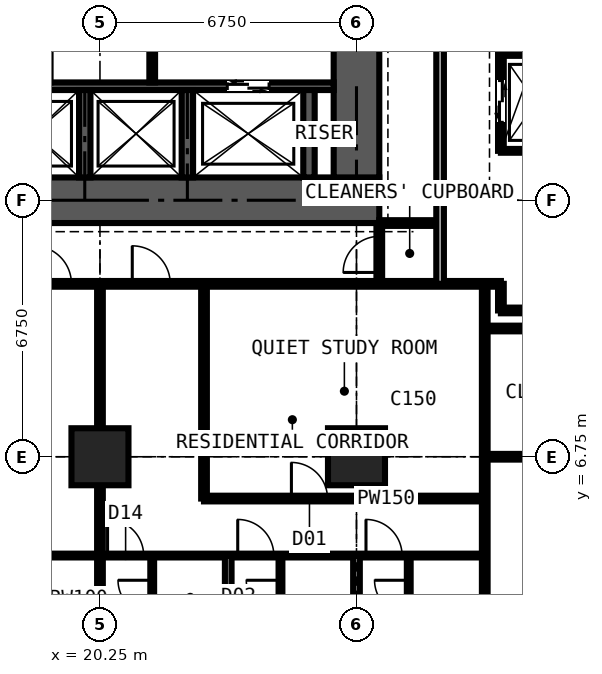
"""IFC4 building model, lengths in metres.
Left out: names, types, materials, properties, quantities, classifications, styles, units other than length and angle.
Written with IfcOpenShell. Run it as: python <this file> out.ifc"""

import sys

from ifc_helpers import new_model, si_unit, direction, frame, frame_2d, origin, origin_2d, place, context, subcontext, project, spatial, rectangle, extrude, element, fill, save


model = new_model("IFC4")
c1 = context("Model", 3, precision=1e-05, world=origin(), true_north=direction((0.0, 1.0)))
c2 = subcontext(c1, "Body", "Model", "MODEL_VIEW")
j1 = project(units=[si_unit("LENGTHUNIT", "METRE"), si_unit("PLANEANGLEUNIT", "RADIAN")], contexts=[c1])
p1 = place(None, origin())
s1 = spatial("IfcSite", under=j1, at=p1, CompositionType="ELEMENT")
p2 = place(p1, origin())
s2 = spatial("IfcBuilding", under=s1, at=p2, CompositionType="ELEMENT")
p3 = place(p2, frame((0.0, 0.0, 123.3)))
s3 = spatial("IfcBuildingStorey", under=s2, at=p3, CompositionType="ELEMENT", Elevation=123.3)
for number, where, z_axis, x_axis in (
    (1, (20.25, 6.75, 0.0), (0.0, 0.0, 1.0), (1.0, 0.0, 0.0)),
    (2, (27.0, 6.75, 0.0), (0.0, 0.0, 1.0), (1.0, 0.0, 0.0)),
):
    element("IfcColumn", number, at=place(p3, frame(where, z_axis=z_axis, x_axis=x_axis)), inside=s3, PredefinedType="COLUMN", context=c2, shape_type="SweptSolid", body=[
        extrude(rectangle(XDim=1.5, YDim=1.5, at=origin_2d()), origin(), (0.0, 0.0, 1.0), 3.6),
    ])
p4 = place(p3, frame((12.9, 13.5, 0.0), z_axis=(0.0, 0.0, 1.0), x_axis=(1.0, 0.0, 0.0)))
e3 = element("IfcWall", 3, at=p4, inside=s3, PredefinedType="SHEAR", context=c2, shape_type="SweptSolid", body=[
    extrude(rectangle(XDim=14.7, YDim=1.2, at=frame_2d((7.35, 0.0))), origin(), (0.0, 0.0, 1.0), 3.6),
])
p5 = place(p3, frame((27.0, 14.1, 0.0), z_axis=(0.0, 0.0, 1.0), x_axis=(0.0, 1.0, 0.0)))
e4 = element("IfcWall", 4, at=p5, inside=s3, PredefinedType="SHEAR", context=c2, shape_type="SweptSolid", body=[
    extrude(rectangle(XDim=12.3, YDim=1.2, at=frame_2d((6.15, 0.0))), origin(), (0.0, 0.0, 1.0), 3.6),
])
p6 = place(p5, frame((3.65, 0.0, 0.0)))
e5 = element("IfcOpeningElement", 5, at=p6, cuts=e4, PredefinedType="OPENING", context=c2, shape_type="SweptSolid", body=[
    extrude(rectangle(XDim=1.2, YDim=2.2, at=frame_2d((0.6, 1.1))), frame((0.0, 0.61, 0.0), z_axis=(0.0, -1.0, 0.0), x_axis=(1.0, 0.0, 0.0)), (0.0, 0.0, 1.0), 1.22),
])
p7 = place(p3, frame((14.1, 16.5, 0.0), z_axis=(0.0, 0.0, 1.0), x_axis=(1.0, 0.0, 0.0)))
e6 = element("IfcWall", 6, at=p7, inside=s3, PredefinedType="SHEAR", context=c2, shape_type="SweptSolid", body=[
    extrude(rectangle(XDim=12.3, YDim=0.2, at=frame_2d((6.15, 0.0))), origin(), (0.0, 0.0, 1.0), 3.6),
])
p8 = place(p7, frame((0.9, 0.0, 0.0)))
e7 = element("IfcOpeningElement", 7, at=p8, cuts=e6, PredefinedType="OPENING", context=c2, shape_type="SweptSolid", body=[
    extrude(rectangle(XDim=1.1, YDim=2.2, at=frame_2d((0.55, 1.1))), frame((0.0, 0.11, 0.0), z_axis=(0.0, -1.0, 0.0), x_axis=(1.0, 0.0, 0.0)), (0.0, 0.0, 1.0), 0.22),
])
p9 = place(p7, frame((9.5, 0.0, 0.0)))
e8 = element("IfcOpeningElement", 8, at=p9, cuts=e6, PredefinedType="OPENING", context=c2, shape_type="SweptSolid", body=[
    extrude(rectangle(XDim=1.1, YDim=2.2, at=frame_2d((0.55, 1.1))), frame((0.0, 0.11, 0.0), z_axis=(0.0, -1.0, 0.0), x_axis=(1.0, 0.0, 0.0)), (0.0, 0.0, 1.0), 0.22),
])
for number, where, z_axis, x_axis in (
    (9, (19.85, 14.1, 0.0), (0.0, 0.0, 1.0), (0.0, 1.0, 0.0)),
    (10, (22.55, 14.1, 0.0), (0.0, 0.0, 1.0), (0.0, 1.0, 0.0)),
    (11, (25.75, 14.1, 0.0), (0.0, 0.0, 1.0), (0.0, 1.0, 0.0)),
):
    element("IfcWall", number, at=place(p3, frame(where, z_axis=z_axis, x_axis=x_axis)), inside=s3, PredefinedType="SHEAR", context=c2, shape_type="SweptSolid", body=[
        extrude(rectangle(XDim=2.3, YDim=0.3, at=frame_2d((1.15, 0.0))), origin(), (0.0, 0.0, 1.0), 3.6),
    ])
p10 = place(p3, frame((21.625, 16.6, 0.0), z_axis=(0.0, 0.0, 1.0), x_axis=(0.0, 1.0, 0.0)))
e12 = element("IfcWall", 12, at=p10, inside=s3, PredefinedType="PARTITIONING", context=c2, shape_type="SweptSolid", body=[
    extrude(rectangle(XDim=3.5, YDim=0.15, at=frame_2d((1.75, 0.0))), origin(), (0.0, 0.0, 1.0), 3.375),
])
p11 = place(p10, frame((1.15, 0.0, 0.0)))
e13 = element("IfcOpeningElement", 13, at=p11, cuts=e12, PredefinedType="OPENING", context=c2, shape_type="SweptSolid", body=[
    extrude(rectangle(XDim=1.2, YDim=2.2, at=frame_2d((0.6, 1.1))), frame((0.0, 0.085, 0.0), z_axis=(0.0, -1.0, 0.0), x_axis=(1.0, 0.0, 0.0)), (0.0, 0.0, 1.0), 0.17),
])
p12 = place(p3, frame((6.75, 4.15, 0.0), z_axis=(0.0, 0.0, 1.0), x_axis=(1.0, 0.0, 0.0)))
e14 = element("IfcWall", 14, at=p12, inside=s3, PredefinedType="PARTITIONING", context=c2, shape_type="SweptSolid", body=[
    extrude(rectangle(XDim=23.625, YDim=0.1, at=frame_2d((11.812, 0.0))), origin(), (0.0, 0.0, 1.0), 3.375),
])
p13 = place(p12, frame((2.85, 0.0, 0.0)))
e15 = element("IfcOpeningElement", 15, at=p13, cuts=e14, PredefinedType="OPENING", context=c2, shape_type="SweptSolid", body=[
    extrude(rectangle(XDim=1.0, YDim=2.2, at=frame_2d((0.5, 1.1))), frame((0.0, 0.06, 0.0), z_axis=(0.0, -1.0, 0.0), x_axis=(1.0, 0.0, 0.0)), (0.0, 0.0, 1.0), 0.12),
])
p14 = place(p12, frame((6.95, 0.0, 0.0)))
e16 = element("IfcOpeningElement", 16, at=p14, cuts=e14, PredefinedType="OPENING", context=c2, shape_type="SweptSolid", body=[
    extrude(rectangle(XDim=0.95, YDim=2.2, at=frame_2d((0.475, 1.1))), frame((0.0, 0.06, 0.0), z_axis=(0.0, -1.0, 0.0), x_axis=(1.0, 0.0, 0.0)), (0.0, 0.0, 1.0), 0.12),
])
p15 = place(p12, frame((10.375, 0.0, 0.0)))
e17 = element("IfcOpeningElement", 17, at=p15, cuts=e14, PredefinedType="OPENING", context=c2, shape_type="SweptSolid", body=[
    extrude(rectangle(XDim=0.95, YDim=2.2, at=frame_2d((0.475, 1.1))), frame((0.0, 0.06, 0.0), z_axis=(0.0, -1.0, 0.0), x_axis=(1.0, 0.0, 0.0)), (0.0, 0.0, 1.0), 0.12),
])
p16 = place(p12, frame((13.7, 0.0, 0.0)))
e18 = element("IfcOpeningElement", 18, at=p16, cuts=e14, PredefinedType="OPENING", context=c2, shape_type="SweptSolid", body=[
    extrude(rectangle(XDim=0.95, YDim=2.2, at=frame_2d((0.475, 1.1))), frame((0.0, 0.06, 0.0), z_axis=(0.0, -1.0, 0.0), x_axis=(1.0, 0.0, 0.0)), (0.0, 0.0, 1.0), 0.12),
])
p17 = place(p12, frame((17.125, 0.0, 0.0)))
e19 = element("IfcOpeningElement", 19, at=p17, cuts=e14, PredefinedType="OPENING", context=c2, shape_type="SweptSolid", body=[
    extrude(rectangle(XDim=0.95, YDim=2.2, at=frame_2d((0.475, 1.1))), frame((0.0, 0.06, 0.0), z_axis=(0.0, -1.0, 0.0), x_axis=(1.0, 0.0, 0.0)), (0.0, 0.0, 1.0), 0.12),
])
p18 = place(p12, frame((20.5, 0.0, 0.0)))
e20 = element("IfcOpeningElement", 20, at=p18, cuts=e14, PredefinedType="OPENING", context=c2, shape_type="SweptSolid", body=[
    extrude(rectangle(XDim=0.95, YDim=2.2, at=frame_2d((0.475, 1.1))), frame((0.0, 0.06, 0.0), z_axis=(0.0, -1.0, 0.0), x_axis=(1.0, 0.0, 0.0)), (0.0, 0.0, 1.0), 0.12),
])
p19 = place(p3, frame((10.125, 11.3, 0.0), z_axis=(0.0, 0.0, 1.0), x_axis=(1.0, 0.0, 0.0)))
e21 = element("IfcWall", 21, at=p19, inside=s3, PredefinedType="PARTITIONING", context=c2, shape_type="SweptSolid", body=[
    extrude(rectangle(XDim=20.675, YDim=0.15, at=frame_2d((10.337, 0.0))), origin(), (0.0, 0.0, 1.0), 3.375),
])
p20 = place(p19, frame((8.375, 0.0, 0.0)))
e22 = element("IfcOpeningElement", 22, at=p20, cuts=e21, PredefinedType="OPENING", context=c2, shape_type="SweptSolid", body=[
    extrude(rectangle(XDim=1.0, YDim=2.2, at=frame_2d((0.5, 1.1))), frame((0.0, 0.085, 0.0), z_axis=(0.0, -1.0, 0.0), x_axis=(1.0, 0.0, 0.0)), (0.0, 0.0, 1.0), 0.17),
])
p21 = place(p19, frame((10.975, 0.0, 0.0)))
e23 = element("IfcOpeningElement", 23, at=p21, cuts=e21, PredefinedType="OPENING", context=c2, shape_type="SweptSolid", body=[
    extrude(rectangle(XDim=1.0, YDim=2.2, at=frame_2d((0.5, 1.1))), frame((0.0, 0.085, 0.0), z_axis=(0.0, -1.0, 0.0), x_axis=(1.0, 0.0, 0.0)), (0.0, 0.0, 1.0), 0.17),
])
p22 = place(p19, frame((3.925, 0.0, 0.0)))
e24 = element("IfcOpeningElement", 24, at=p22, cuts=e21, PredefinedType="OPENING", context=c2, shape_type="SweptSolid", body=[
    extrude(rectangle(XDim=0.95, YDim=2.2, at=frame_2d((0.475, 1.1))), frame((0.0, 0.085, 0.0), z_axis=(0.0, -1.0, 0.0), x_axis=(1.0, 0.0, 0.0)), (0.0, 0.0, 1.0), 0.17),
])
p23 = place(p3, frame((20.25, -0.734, 0.0), z_axis=(0.0, 0.0, 1.0), x_axis=(0.0, 1.0, 0.0)))
e25 = element("IfcWall", 25, at=p23, inside=s3, PredefinedType="PARTITIONING", context=c2, shape_type="SweptSolid", body=[
    extrude(rectangle(XDim=12.034, YDim=0.15, at=frame_2d((6.017, 0.0))), origin(), (0.0, 0.0, 1.0), 2.61),
])
p24 = place(p3, frame((21.625, 1.95, 0.0), z_axis=(0.0, 0.0, 1.0), x_axis=(0.0, 1.0, 0.0)))
e26 = element("IfcWall", 26, at=p24, inside=s3, PredefinedType="PARTITIONING", context=c2, shape_type="SweptSolid", body=[
    extrude(rectangle(XDim=2.2, YDim=0.1, at=frame_2d((1.1, 0.0))), origin(), (0.0, 0.0, 1.0), 3.375),
])
p25 = place(p24, frame((0.65, 0.0, 0.0)))
e27 = element("IfcOpeningElement", 27, at=p25, cuts=e26, PredefinedType="OPENING", context=c2, shape_type="SweptSolid", body=[
    extrude(rectangle(XDim=0.9, YDim=2.2, at=frame_2d((0.45, 1.1))), frame((0.0, 0.06, 0.0), z_axis=(0.0, -1.0, 0.0), x_axis=(1.0, 0.0, 0.0)), (0.0, 0.0, 1.0), 0.12),
])
p26 = place(p3, frame((22.988, 5.65, 0.0), z_axis=(0.0, 0.0, 1.0), x_axis=(1.0, 0.0, 0.0)))
e28 = element("IfcWall", 28, at=p26, inside=s3, PredefinedType="PARTITIONING", context=c2, shape_type="SweptSolid", body=[
    extrude(rectangle(XDim=7.387, YDim=0.15, at=frame_2d((3.694, 0.0))), origin(), (0.0, 0.0, 1.0), 3.375),
])
p27 = place(p26, frame((2.3, 0.0, 0.0)))
e29 = element("IfcOpeningElement", 29, at=p27, cuts=e28, PredefinedType="OPENING", context=c2, shape_type="SweptSolid", body=[
    extrude(rectangle(XDim=0.95, YDim=2.2, at=frame_2d((0.475, 1.1))), frame((0.0, 0.085, 0.0), z_axis=(0.0, -1.0, 0.0), x_axis=(1.0, 0.0, 0.0)), (0.0, 0.0, 1.0), 0.17),
])
p28 = place(p3, frame((22.988, 5.65, 0.0), z_axis=(0.0, 0.0, 1.0), x_axis=(0.0, 1.0, 0.0)))
e30 = element("IfcWall", 30, at=p28, inside=s3, PredefinedType="PARTITIONING", context=c2, shape_type="SweptSolid", body=[
    extrude(rectangle(XDim=5.65, YDim=0.15, at=frame_2d((2.825, 0.0))), origin(), (0.0, 0.0, 1.0), 3.375),
])
p29 = place(p3, frame((23.625, -0.734, 0.0), z_axis=(0.0, 0.0, 1.0), x_axis=(0.0, 1.0, 0.0)))
e31 = element("IfcWall", 31, at=p29, inside=s3, PredefinedType="PARTITIONING", context=c2, shape_type="SweptSolid", body=[
    extrude(rectangle(XDim=4.884, YDim=0.175, at=frame_2d((2.442, 0.0))), origin(), (0.0, 0.0, 1.0), 3.375),
])
p30 = place(p3, frame((25.0, 1.95, 0.0), z_axis=(0.0, 0.0, 1.0), x_axis=(0.0, 1.0, 0.0)))
e32 = element("IfcWall", 32, at=p30, inside=s3, PredefinedType="PARTITIONING", context=c2, shape_type="SweptSolid", body=[
    extrude(rectangle(XDim=2.2, YDim=0.1, at=frame_2d((1.1, 0.0))), origin(), (0.0, 0.0, 1.0), 3.375),
])
p31 = place(p30, frame((0.65, 0.0, 0.0)))
e33 = element("IfcOpeningElement", 33, at=p31, cuts=e32, PredefinedType="OPENING", context=c2, shape_type="SweptSolid", body=[
    extrude(rectangle(XDim=0.9, YDim=2.2, at=frame_2d((0.45, 1.1))), frame((0.0, 0.06, 0.0), z_axis=(0.0, -1.0, 0.0), x_axis=(1.0, 0.0, 0.0)), (0.0, 0.0, 1.0), 0.12),
])
p32 = place(p3, frame((27.0, -0.734, 0.0), z_axis=(0.0, 0.0, 1.0), x_axis=(0.0, 1.0, 0.0)))
e34 = element("IfcWall", 34, at=p32, inside=s3, PredefinedType="PARTITIONING", context=c2, shape_type="SweptSolid", body=[
    extrude(rectangle(XDim=4.884, YDim=0.175, at=frame_2d((2.442, 0.0))), origin(), (0.0, 0.0, 1.0), 2.61),
])
p33 = place(p3, frame((27.6, 11.3, 0.0), z_axis=(0.0, 0.0, 1.0), x_axis=(0.0, 1.0, 0.0)))
e35 = element("IfcWall", 35, at=p33, inside=s3, PredefinedType="PARTITIONING", context=c2, shape_type="SweptSolid", body=[
    extrude(rectangle(XDim=1.6, YDim=0.15, at=frame_2d((0.8, 0.0))), origin(), (0.0, 0.0, 1.0), 3.375),
])
p34 = place(p33, frame((0.3, 0.0, 0.0)))
e36 = element("IfcOpeningElement", 36, at=p34, cuts=e35, PredefinedType="OPENING", context=c2, shape_type="SweptSolid", body=[
    extrude(rectangle(XDim=0.95, YDim=2.2, at=frame_2d((0.475, 1.1))), frame((0.0, 0.085, 0.0), z_axis=(0.0, -1.0, 0.0), x_axis=(1.0, 0.0, 0.0)), (0.0, 0.0, 1.0), 0.17),
])
p35 = place(p3, frame((27.6, 12.9, 0.0), z_axis=(0.0, 0.0, 1.0), x_axis=(1.0, 0.0, 0.0)))
e37 = element("IfcWall", 37, at=p35, inside=s3, PredefinedType="PARTITIONING", context=c2, shape_type="SweptSolid", body=[
    extrude(rectangle(XDim=1.6, YDim=0.15, at=frame_2d((0.8, 0.0))), origin(), (0.0, 0.0, 1.0), 2.806),
])
p36 = place(p3, frame((28.375, 1.95, 0.0), z_axis=(0.0, 0.0, 1.0), x_axis=(0.0, 1.0, 0.0)))
e38 = element("IfcWall", 38, at=p36, inside=s3, PredefinedType="PARTITIONING", context=c2, shape_type="SweptSolid", body=[
    extrude(rectangle(XDim=2.2, YDim=0.1, at=frame_2d((1.1, 0.0))), origin(), (0.0, 0.0, 1.0), 3.375),
])
p37 = place(p36, frame((0.65, 0.0, 0.0)))
e39 = element("IfcOpeningElement", 39, at=p37, cuts=e38, PredefinedType="OPENING", context=c2, shape_type="SweptSolid", body=[
    extrude(rectangle(XDim=0.9, YDim=2.2, at=frame_2d((0.45, 1.1))), frame((0.0, 0.06, 0.0), z_axis=(0.0, -1.0, 0.0), x_axis=(1.0, 0.0, 0.0)), (0.0, 0.0, 1.0), 0.12),
])
p38 = place(p3, frame((29.2, 11.3, 0.0), z_axis=(0.0, 0.0, 1.0), x_axis=(0.0, 1.0, 0.0)))
e40 = element("IfcWall", 40, at=p38, inside=s3, PredefinedType="PARTITIONING", context=c2, shape_type="SweptSolid", body=[
    extrude(rectangle(XDim=17.9, YDim=0.2, at=frame_2d((8.95, 0.0))), origin(), (0.0, 0.0, 1.0), 3.375),
])
p39 = place(p38, frame((8.35, 0.0, 0.0)))
e41 = element("IfcOpeningElement", 41, at=p39, cuts=e40, PredefinedType="OPENING", context=c2, shape_type="SweptSolid", body=[
    extrude(rectangle(XDim=1.2, YDim=2.2, at=frame_2d((0.6, 1.1))), frame((0.0, 0.11, 0.0), z_axis=(0.0, -1.0, 0.0), x_axis=(1.0, 0.0, 0.0)), (0.0, 0.0, 1.0), 0.22),
])
p40 = place(p3, frame((30.375, -0.734, 0.0), z_axis=(0.0, 0.0, 1.0), x_axis=(0.0, 1.0, 0.0)))
e42 = element("IfcWall", 42, at=p40, inside=s3, PredefinedType="PARTITIONING", context=c2, shape_type="SweptSolid", body=[
    extrude(rectangle(XDim=12.034, YDim=0.15, at=frame_2d((6.017, 0.0))), origin(), (0.0, 0.0, 1.0), 3.375),
])
p41 = place(p3, frame((30.375, 6.75, 0.0), z_axis=(0.0, 0.0, 1.0), x_axis=(1.0, 0.0, 0.0)))
e43 = element("IfcWall", 43, at=p41, inside=s3, PredefinedType="PARTITIONING", context=c2, shape_type="SweptSolid", body=[
    extrude(rectangle(XDim=10.859, YDim=0.15, at=frame_2d((5.429, 0.0))), origin(), (0.0, 0.0, 1.0), 2.877),
])
p42 = place(p41, frame((1.6, 0.0, 0.0)))
e44 = element("IfcOpeningElement", 44, at=p42, cuts=e43, PredefinedType="OPENING", context=c2, shape_type="SweptSolid", body=[
    extrude(rectangle(XDim=1.0, YDim=2.2, at=frame_2d((0.5, 1.1))), frame((0.0, 0.085, 0.0), z_axis=(0.0, -1.0, 0.0), x_axis=(1.0, 0.0, 0.0)), (0.0, 0.0, 1.0), 0.17),
])
p43 = place(p3, frame((30.375, 10.125, 0.0), z_axis=(0.0, 0.0, 1.0), x_axis=(1.0, 0.0, 0.0)))
e45 = element("IfcWall", 45, at=p43, inside=s3, PredefinedType="PARTITIONING", context=c2, shape_type="SweptSolid", body=[
    extrude(rectangle(XDim=10.859, YDim=0.15, at=frame_2d((5.429, 0.0))), origin(), (0.0, 0.0, 1.0), 3.375),
])
p44 = place(p43, frame((2.5, 0.0, 0.0)))
e46 = element("IfcOpeningElement", 46, at=p44, cuts=e45, PredefinedType="OPENING", context=c2, shape_type="SweptSolid", body=[
    extrude(rectangle(XDim=1.0, YDim=2.2, at=frame_2d((0.5, 1.1))), frame((0.0, 0.085, 0.0), z_axis=(0.0, -1.0, 0.0), x_axis=(1.0, 0.0, 0.0)), (0.0, 0.0, 1.0), 0.17),
])
p45 = place(p3, frame((30.8, 10.6, 0.0), z_axis=(0.0, 0.0, 1.0), x_axis=(0.0, 1.0, 0.0)))
e47 = element("IfcWall", 47, at=p45, inside=s3, PredefinedType="PARTITIONING", context=c2, shape_type="SweptSolid", body=[
    extrude(rectangle(XDim=0.7, YDim=0.15, at=frame_2d((0.35, 0.0))), origin(), (0.0, 0.0, 1.0), 3.375),
])
p46 = place(p3, frame((30.8, 10.6, 0.0), z_axis=(0.0, 0.0, 1.0), x_axis=(1.0, 0.0, 0.0)))
e48 = element("IfcWall", 48, at=p46, inside=s3, PredefinedType="PARTITIONING", context=c2, shape_type="SweptSolid", body=[
    extrude(rectangle(XDim=1.85, YDim=0.15, at=frame_2d((0.925, 0.0))), origin(), (0.0, 0.0, 1.0), 3.375),
])
p47 = place(p3, frame((30.8, 14.8, 0.0), z_axis=(0.0, 0.0, 1.0), x_axis=(0.0, 1.0, 0.0)))
e49 = element("IfcWall", 49, at=p47, inside=s3, PredefinedType="PARTITIONING", context=c2, shape_type="SweptSolid", body=[
    extrude(rectangle(XDim=10.9, YDim=0.15, at=frame_2d((5.45, 0.0))), origin(), (0.0, 0.0, 1.0), 3.375),
])
p48 = place(p47, frame((0.75, 0.0, 0.0)))
e50 = element("IfcOpeningElement", 50, at=p48, cuts=e49, PredefinedType="OPENING", context=c2, shape_type="SweptSolid", body=[
    extrude(rectangle(XDim=1.1, YDim=2.2, at=frame_2d((0.55, 1.1))), frame((0.0, 0.085, 0.0), z_axis=(0.0, -1.0, 0.0), x_axis=(1.0, 0.0, 0.0)), (0.0, 0.0, 1.0), 0.17),
])
p49 = place(p47, frame((3.25, 0.0, 0.0)))
e51 = element("IfcOpeningElement", 51, at=p49, cuts=e49, PredefinedType="OPENING", context=c2, shape_type="SweptSolid", body=[
    extrude(rectangle(XDim=1.1, YDim=2.2, at=frame_2d((0.55, 1.1))), frame((0.0, 0.085, 0.0), z_axis=(0.0, -1.0, 0.0), x_axis=(1.0, 0.0, 0.0)), (0.0, 0.0, 1.0), 0.17),
])
p50 = place(p47, frame((6.5, 0.0, 0.0)))
e52 = element("IfcOpeningElement", 52, at=p50, cuts=e49, PredefinedType="OPENING", context=c2, shape_type="SweptSolid", body=[
    extrude(rectangle(XDim=1.1, YDim=2.2, at=frame_2d((0.55, 1.1))), frame((0.0, 0.085, 0.0), z_axis=(0.0, -1.0, 0.0), x_axis=(1.0, 0.0, 0.0)), (0.0, 0.0, 1.0), 0.17),
])
p51 = place(p47, frame((9.05, 0.0, 0.0)))
e53 = element("IfcOpeningElement", 53, at=p51, cuts=e49, PredefinedType="OPENING", context=c2, shape_type="SweptSolid", body=[
    extrude(rectangle(XDim=1.1, YDim=2.2, at=frame_2d((0.55, 1.1))), frame((0.0, 0.085, 0.0), z_axis=(0.0, -1.0, 0.0), x_axis=(1.0, 0.0, 0.0)), (0.0, 0.0, 1.0), 0.17),
])
for number, where, z_axis, x_axis in (
    (54, (30.8, 14.8, 0.0), (0.0, 0.0, 1.0), (1.0, 0.0, 0.0)),
    (55, (30.8, 17.35, 0.0), (0.0, 0.0, 1.0), (1.0, 0.0, 0.0)),
):
    element("IfcWall", number, at=place(p3, frame(where, z_axis=z_axis, x_axis=x_axis)), inside=s3, PredefinedType="SHEAR", context=c2, shape_type="SweptSolid", body=[
        extrude(rectangle(XDim=1.85, YDim=0.1, at=frame_2d((0.925, 0.0))), origin(), (0.0, 0.0, 1.0), 3.375),
    ])
p52 = place(p9, origin())
e56 = element("IfcDoor", 56, at=p52, inside=s3, OperationType="DOUBLE_DOOR_SLIDING", PredefinedType="DOOR", context=c2, shape_type="SweptSolid", body=[
    extrude(rectangle(XDim=1.1, YDim=2.2, at=frame_2d((0.55, 1.1))), frame((0.0, 0.025, 0.0), z_axis=(0.0, -1.0, 0.0), x_axis=(1.0, 0.0, 0.0)), (0.0, 0.0, 1.0), 0.05),
])
fill(e8, e56)
p53 = place(p34, origin())
e57 = element("IfcDoor", 57, at=p53, inside=s3, OperationType="SINGLE_SWING_LEFT", PredefinedType="DOOR", context=c2, shape_type="SweptSolid", body=[
    extrude(rectangle(XDim=0.95, YDim=2.2, at=frame_2d((0.475, 1.1))), frame((0.0, 0.025, 0.0), z_axis=(0.0, -1.0, 0.0), x_axis=(1.0, 0.0, 0.0)), (0.0, 0.0, 1.0), 0.05),
])
fill(e36, e57)
p54 = place(p20, origin())
e58 = element("IfcDoor", 58, at=p54, inside=s3, OperationType="SINGLE_SWING_LEFT", PredefinedType="DOOR", context=c2, shape_type="SweptSolid", body=[
    extrude(rectangle(XDim=1.0, YDim=2.2, at=frame_2d((0.5, 1.1))), frame((0.0, 0.025, 0.0), z_axis=(0.0, -1.0, 0.0), x_axis=(1.0, 0.0, 0.0)), (0.0, 0.0, 1.0), 0.05),
])
fill(e22, e58)
p55 = place(p16, origin())
e59 = element("IfcDoor", 59, at=p55, inside=s3, OperationType="SINGLE_SWING_LEFT", PredefinedType="DOOR", context=c2, shape_type="SweptSolid", body=[
    extrude(rectangle(XDim=0.95, YDim=2.2, at=frame_2d((0.475, 1.1))), frame((0.0, 0.025, 0.0), z_axis=(0.0, -1.0, 0.0), x_axis=(1.0, 0.0, 0.0)), (0.0, 0.0, 1.0), 0.05),
])
fill(e18, e59)
p56 = place(p25, origin())
e60 = element("IfcDoor", 60, at=p56, inside=s3, OperationType="SINGLE_SWING_RIGHT", PredefinedType="DOOR", context=c2, shape_type="SweptSolid", body=[
    extrude(rectangle(XDim=0.9, YDim=2.2, at=frame_2d((0.45, 1.1))), frame((0.0, 0.025, 0.0), z_axis=(0.0, -1.0, 0.0), x_axis=(1.0, 0.0, 0.0)), (0.0, 0.0, 1.0), 0.05),
])
fill(e27, e60)
p57 = place(p17, origin())
e61 = element("IfcDoor", 61, at=p57, inside=s3, OperationType="SINGLE_SWING_LEFT", PredefinedType="DOOR", context=c2, shape_type="SweptSolid", body=[
    extrude(rectangle(XDim=0.95, YDim=2.2, at=frame_2d((0.475, 1.1))), frame((0.0, 0.025, 0.0), z_axis=(0.0, -1.0, 0.0), x_axis=(1.0, 0.0, 0.0)), (0.0, 0.0, 1.0), 0.05),
])
fill(e19, e61)
p58 = place(p31, origin())
e62 = element("IfcDoor", 62, at=p58, inside=s3, OperationType="SINGLE_SWING_RIGHT", PredefinedType="DOOR", context=c2, shape_type="SweptSolid", body=[
    extrude(rectangle(XDim=0.9, YDim=2.2, at=frame_2d((0.45, 1.1))), frame((0.0, 0.025, 0.0), z_axis=(0.0, -1.0, 0.0), x_axis=(1.0, 0.0, 0.0)), (0.0, 0.0, 1.0), 0.05),
])
fill(e33, e62)
p59 = place(p18, origin())
e63 = element("IfcDoor", 63, at=p59, inside=s3, OperationType="SINGLE_SWING_LEFT", PredefinedType="DOOR", context=c2, shape_type="SweptSolid", body=[
    extrude(rectangle(XDim=0.95, YDim=2.2, at=frame_2d((0.475, 1.1))), frame((0.0, 0.025, 0.0), z_axis=(0.0, -1.0, 0.0), x_axis=(1.0, 0.0, 0.0)), (0.0, 0.0, 1.0), 0.05),
])
fill(e20, e63)
p60 = place(p37, origin())
e64 = element("IfcDoor", 64, at=p60, inside=s3, OperationType="SINGLE_SWING_RIGHT", PredefinedType="DOOR", context=c2, shape_type="SweptSolid", body=[
    extrude(rectangle(XDim=0.9, YDim=2.2, at=frame_2d((0.45, 1.1))), frame((0.0, 0.025, 0.0), z_axis=(0.0, -1.0, 0.0), x_axis=(1.0, 0.0, 0.0)), (0.0, 0.0, 1.0), 0.05),
])
fill(e39, e64)
p61 = place(p21, origin())
e65 = element("IfcDoor", 65, at=p61, inside=s3, OperationType="SINGLE_SWING_LEFT", PredefinedType="DOOR", context=c2, shape_type="SweptSolid", body=[
    extrude(rectangle(XDim=1.0, YDim=2.2, at=frame_2d((0.5, 1.1))), frame((0.0, 0.025, 0.0), z_axis=(0.0, -1.0, 0.0), x_axis=(1.0, 0.0, 0.0)), (0.0, 0.0, 1.0), 0.05),
])
fill(e23, e65)
p62 = place(p27, origin())
e66 = element("IfcDoor", 66, at=p62, inside=s3, OperationType="SINGLE_SWING_LEFT", PredefinedType="DOOR", context=c2, shape_type="SweptSolid", body=[
    extrude(rectangle(XDim=0.95, YDim=2.2, at=frame_2d((0.475, 1.1))), frame((0.0, 0.025, 0.0), z_axis=(0.0, -1.0, 0.0), x_axis=(1.0, 0.0, 0.0)), (0.0, 0.0, 1.0), 0.05),
])
fill(e29, e66)
p63 = place(p48, origin())
e67 = element("IfcDoor", 67, at=p63, inside=s3, OperationType="DOUBLE_DOOR_SLIDING", PredefinedType="DOOR", context=c2, shape_type="SweptSolid", body=[
    extrude(rectangle(XDim=1.1, YDim=2.2, at=frame_2d((0.55, 1.1))), frame((0.0, 0.025, 0.0), z_axis=(0.0, -1.0, 0.0), x_axis=(1.0, 0.0, 0.0)), (0.0, 0.0, 1.0), 0.05),
])
fill(e50, e67)
save(model, sys.argv[1])
